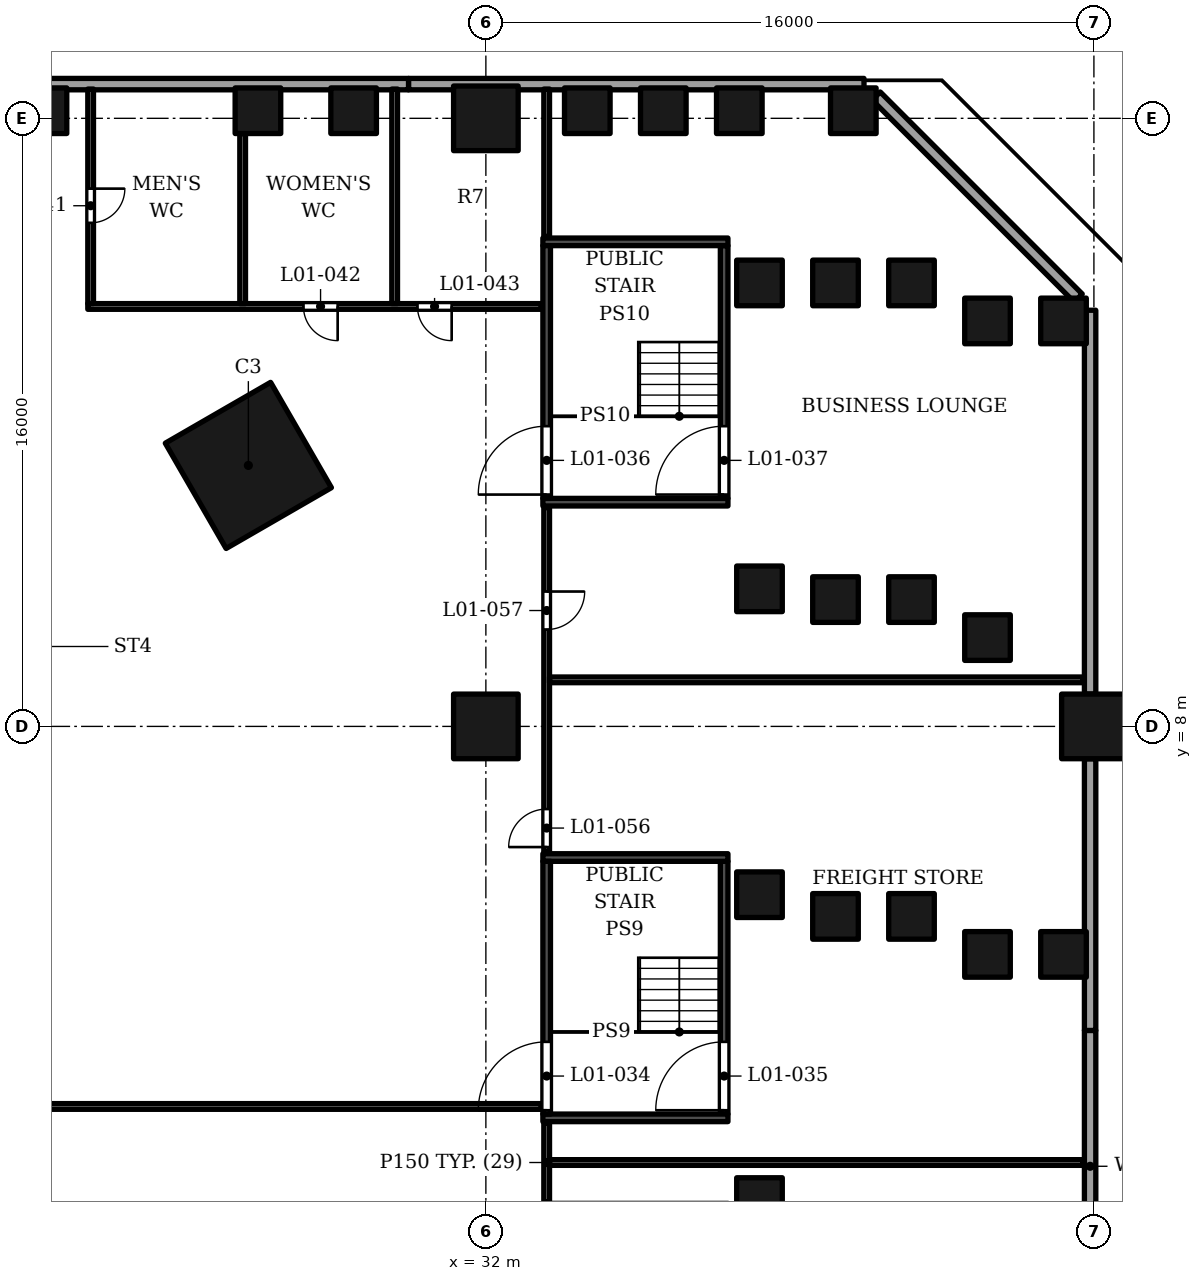
"""IFC4 building model, lengths in metres.
Left out: names, types, materials, properties, quantities, classifications, styles, units other than length and angle.
Written with IfcOpenShell. Run it as: python <this file> out.ifc"""

import sys

from ifc_helpers import new_model, si_unit, direction, frame, frame_2d, origin, origin_2d, place, context, subcontext, project, spatial, rectangle, extrude, element, fill, save


model = new_model("IFC4")
c1 = context("Model", 3, precision=1e-05, world=origin(), true_north=direction((0.0, 1.0)))
c2 = subcontext(c1, "Body", "Model", "MODEL_VIEW")
j1 = project(units=[si_unit("LENGTHUNIT", "METRE"), si_unit("PLANEANGLEUNIT", "RADIAN")], contexts=[c1])
p1 = place(None, origin())
s1 = spatial("IfcSite", under=j1, at=p1, CompositionType="ELEMENT")
p2 = place(p1, origin())
s2 = spatial("IfcBuilding", under=s1, at=p2, CompositionType="ELEMENT")
p3 = place(p2, frame((0.0, 0.0, 9.0)))
s3 = spatial("IfcBuildingStorey", under=s2, at=p3, CompositionType="ELEMENT", Elevation=9.0)
for number, where, z_axis, x_axis in (
    (1, (32.0, 8.0, 0.0), (0.0, 0.0, 1.0), (1.0, 0.0, 0.0)),
    (2, (32.0, 24.0, 0.0), (0.0, 0.0, 1.0), (1.0, 0.0, 0.0)),
    (3, (48.0, 8.0, 0.0), (0.0, 0.0, 1.0), (1.0, 0.0, 0.0)),
):
    element("IfcColumn", number, at=place(p3, frame(where, z_axis=z_axis, x_axis=x_axis)), inside=s3, PredefinedType="COLUMN", context=c2, shape_type="SweptSolid", body=[
        extrude(rectangle(XDim=1.7, YDim=1.7, at=origin_2d()), origin(), (0.0, 0.0, 1.0), 11.0),
    ])
for number, where, z_axis, x_axis in (
    (4, (34.669, 24.2, 0.0), (0.0, 0.0, 1.0), (1.0, 0.0, 0.0)),
    (5, (39.2, 19.669, 0.0), (0.0, 0.0, 1.0), (1.0, 0.0, 0.0)),
    (6, (26.002, 24.2, 0.0), (0.0, 0.0, 1.0), (1.0, 0.0, 0.0)),
    (7, (39.2, 11.62, 0.0), (0.0, 0.0, 1.0), (1.0, 0.0, 0.0)),
    (8, (39.2, 3.572, 0.0), (0.0, 0.0, 1.0), (1.0, 0.0, 0.0)),
    (9, (39.2, -4.476, 0.0), (0.0, 0.0, 1.0), (1.0, 0.0, 0.0)),
    (10, (36.669, 24.2, 0.0), (0.0, 0.0, 1.0), (1.0, 0.0, 0.0)),
    (11, (41.2, 19.669, 0.0), (0.0, 0.0, 1.0), (1.0, 0.0, 0.0)),
    (12, (20.372, 24.2, 0.0), (0.0, 0.0, 1.0), (1.0, 0.0, 0.0)),
    (13, (28.52, 24.2, 0.0), (0.0, 0.0, 1.0), (1.0, 0.0, 0.0)),
    (14, (41.2, 11.337, 0.0), (0.0, 0.0, 1.0), (1.0, 0.0, 0.0)),
    (15, (41.2, 3.001, 0.0), (0.0, 0.0, 1.0), (1.0, 0.0, 0.0)),
    (16, (38.669, 24.2, 0.0), (0.0, 0.0, 1.0), (1.0, 0.0, 0.0)),
    (17, (43.2, 19.669, 0.0), (0.0, 0.0, 1.0), (1.0, 0.0, 0.0)),
    (18, (43.2, 11.337, 0.0), (0.0, 0.0, 1.0), (1.0, 0.0, 0.0)),
    (19, (43.2, 3.001, 0.0), (0.0, 0.0, 1.0), (1.0, 0.0, 0.0)),
    (20, (45.2, 18.669, 0.0), (0.0, 0.0, 1.0), (1.0, 0.0, 0.0)),
    (21, (45.2, 10.337, 0.0), (0.0, 0.0, 1.0), (1.0, 0.0, 0.0)),
    (22, (45.2, 2.001, 0.0), (0.0, 0.0, 1.0), (1.0, 0.0, 0.0)),
    (23, (41.669, 24.2, 0.0), (0.0, 0.0, 1.0), (1.0, 0.0, 0.0)),
    (24, (47.2, 18.669, 0.0), (0.0, 0.0, 1.0), (1.0, 0.0, 0.0)),
    (25, (47.2, 2.001, 0.0), (0.0, 0.0, 1.0), (1.0, 0.0, 0.0)),
):
    element("IfcColumn", number, at=place(p3, frame(where, z_axis=z_axis, x_axis=x_axis)), inside=s3, PredefinedType="COLUMN", context=c2, shape_type="SweptSolid", body=[
        extrude(rectangle(XDim=1.2, YDim=1.2, at=origin_2d()), origin(), (0.0, 0.0, 1.0), 11.0),
    ])
p4 = place(p3, frame((25.75, 14.867, 0.0), z_axis=(0.0, 0.0, 1.0), x_axis=(-0.866025386331, -0.50000003023, 0.0)))
e26 = element("IfcColumn", 26, at=p4, inside=s3, PredefinedType="COLUMN", context=c2, shape_type="SweptSolid", body=[
    extrude(rectangle(XDim=3.2, YDim=3.2, at=origin_2d()), origin(), (0.0, 0.0, 1.0), 11.0),
])
for number, where, z_axis, x_axis in (
    (27, (47.9, -7.148, 0.0), (0.0, 0.0, 1.0), (0.0, 1.0, 0.0)),
    (28, (47.9, 0.0, 0.0), (0.0, 0.0, 1.0), (0.0, 1.0, 0.0)),
):
    element("IfcWall", number, at=place(p3, frame(where, z_axis=z_axis, x_axis=x_axis)), inside=s3, PredefinedType="SOLIDWALL", context=c2, shape_type="SweptSolid", body=[
        extrude(rectangle(XDim=7.148, YDim=0.3, at=frame_2d((3.574, 0.0))), origin(), (0.0, 0.0, 1.0), 9.6),
    ])
p5 = place(p3, frame((47.9, 8.852, 0.0), z_axis=(0.0, 0.0, 1.0), x_axis=(0.0, 1.0, 0.0)))
e29 = element("IfcWall", 29, at=p5, inside=s3, PredefinedType="SOLIDWALL", context=c2, shape_type="SweptSolid", body=[
    extrude(rectangle(XDim=10.098, YDim=0.3, at=frame_2d((5.049, 0.0))), origin(), (0.0, 0.0, 1.0), 9.6),
])
p6 = place(p3, frame((47.588, 19.271, 0.0), z_axis=(0.0, 0.0, 1.0), x_axis=(-0.707106781187, 0.707106781187, 0.0)))
e30 = element("IfcWall", 30, at=p6, inside=s3, PredefinedType="SOLIDWALL", context=c2, shape_type="SweptSolid", body=[
    extrude(rectangle(XDim=7.519, YDim=0.3, at=frame_2d((3.759, 0.0))), origin(), (0.0, 0.0, 1.0), 9.6),
])
p7 = place(p3, frame((41.95, 24.9, 0.0), z_axis=(0.0, 0.0, 1.0), x_axis=(-1.0, 0.0, 0.0)))
e31 = element("IfcWall", 31, at=p7, inside=s3, PredefinedType="SOLIDWALL", context=c2, shape_type="SweptSolid", body=[
    extrude(rectangle(XDim=11.986, YDim=0.3, at=frame_2d((5.993, 0.0))), origin(), (0.0, 0.0, 1.0), 9.6),
])
p8 = place(p3, frame((29.964, 24.9, 0.0), z_axis=(0.0, 0.0, 1.0), x_axis=(-1.0, 0.0, 0.0)))
e32 = element("IfcWall", 32, at=p8, inside=s3, PredefinedType="SOLIDWALL", context=c2, shape_type="SweptSolid", body=[
    extrude(rectangle(XDim=11.986, YDim=0.3, at=frame_2d((5.993, 0.0))), origin(), (0.0, 0.0, 1.0), 9.6),
])
for number, where, z_axis, x_axis in (
    (33, (47.85, -10.395, 11.0), (0.0, 0.0, 1.0), (0.0, 1.0, 0.0)),
    (34, (47.85, 4.302, 11.0), (0.0, 0.0, 1.0), (0.0, 1.0, 0.0)),
):
    element("IfcWall", number, at=place(p3, frame(where, z_axis=z_axis, x_axis=x_axis)), inside=s3, PredefinedType="PARAPET", context=c2, shape_type="SweptSolid", body=[
        extrude(rectangle(XDim=14.698, YDim=0.3, at=frame_2d((7.349, 0.0))), origin(), (0.0, 0.0, 1.0), 1.1),
    ])
p9 = place(p3, frame((47.745, 19.042, 11.0), z_axis=(0.0, 0.0, 1.0), x_axis=(-0.707092029666, 0.7071215324, 0.0)))
e35 = element("IfcWall", 35, at=p9, inside=s3, PredefinedType="PARAPET", context=c2, shape_type="SweptSolid", body=[
    extrude(rectangle(XDim=8.275, YDim=0.3, at=frame_2d((4.138, 0.0))), origin(), (0.0, 0.0, 1.0), 1.1),
])
p10 = place(p3, frame((41.79, 24.85, 11.0), z_axis=(0.0, 0.0, 1.0), x_axis=(-1.0, 0.0, 0.0)))
e36 = element("IfcWall", 36, at=p10, inside=s3, PredefinedType="PARAPET", context=c2, shape_type="SweptSolid", body=[
    extrude(rectangle(XDim=1.04, YDim=0.3, at=frame_2d((0.52, 0.0))), origin(), (0.0, 0.0, 1.0), 1.1),
])
for number, where, z_axis, x_axis in (
    (37, (33.5, -2.3, 0.0), (0.0, 0.0, 1.0), (1.0, 0.0, 0.0)),
    (38, (33.5, 4.55, 0.0), (0.0, 0.0, 1.0), (1.0, 0.0, 0.0)),
):
    element("IfcWall", number, at=place(p3, frame(where, z_axis=z_axis, x_axis=x_axis)), inside=s3, PredefinedType="SOLIDWALL", context=c2, shape_type="SweptSolid", body=[
        extrude(rectangle(XDim=4.87, YDim=0.2, at=frame_2d((2.435, 0.0))), origin(), (0.0, 0.0, 1.0), 10.5),
    ])
p11 = place(p3, frame((33.6, -2.2, 0.0), z_axis=(0.0, 0.0, 1.0), x_axis=(0.0, 1.0, 0.0)))
e39 = element("IfcWall", 39, at=p11, inside=s3, PredefinedType="SOLIDWALL", context=c2, shape_type="SweptSolid", body=[
    extrude(rectangle(XDim=6.65, YDim=0.2, at=frame_2d((3.325, 0.0))), origin(), (0.0, 0.0, 1.0), 10.5),
])
p12 = place(p11, frame((0.1, 0.0, 0.0)))
e40 = element("IfcOpeningElement", 40, at=p12, cuts=e39, PredefinedType="OPENING", context=c2, shape_type="SweptSolid", body=[
    extrude(rectangle(XDim=1.8, YDim=2.4, at=frame_2d((0.9, 1.2))), frame((0.0, 0.11, 0.0), z_axis=(0.0, -1.0, 0.0), x_axis=(1.0, 0.0, 0.0)), (0.0, 0.0, 1.0), 0.22),
])
p13 = place(p3, frame((38.27, -2.2, 0.0), z_axis=(0.0, 0.0, 1.0), x_axis=(0.0, 1.0, 0.0)))
e41 = element("IfcWall", 41, at=p13, inside=s3, PredefinedType="SOLIDWALL", context=c2, shape_type="SweptSolid", body=[
    extrude(rectangle(XDim=6.65, YDim=0.2, at=frame_2d((3.325, 0.0))), origin(), (0.0, 0.0, 1.0), 10.5),
])
p14 = place(p13, frame((0.1, 0.0, 0.0)))
e42 = element("IfcOpeningElement", 42, at=p14, cuts=e41, PredefinedType="OPENING", context=c2, shape_type="SweptSolid", body=[
    extrude(rectangle(XDim=1.8, YDim=2.4, at=frame_2d((0.9, 1.2))), frame((0.0, 0.11, 0.0), z_axis=(0.0, -1.0, 0.0), x_axis=(1.0, 0.0, 0.0)), (0.0, 0.0, 1.0), 0.22),
])
for number, where, z_axis, x_axis in (
    (43, (33.5, 13.9, 0.0), (0.0, 0.0, 1.0), (1.0, 0.0, 0.0)),
    (44, (33.5, 20.75, 0.0), (0.0, 0.0, 1.0), (1.0, 0.0, 0.0)),
):
    element("IfcWall", number, at=place(p3, frame(where, z_axis=z_axis, x_axis=x_axis)), inside=s3, PredefinedType="SOLIDWALL", context=c2, shape_type="SweptSolid", body=[
        extrude(rectangle(XDim=4.87, YDim=0.2, at=frame_2d((2.435, 0.0))), origin(), (0.0, 0.0, 1.0), 10.5),
    ])
p15 = place(p3, frame((33.6, 14.0, 0.0), z_axis=(0.0, 0.0, 1.0), x_axis=(0.0, 1.0, 0.0)))
e45 = element("IfcWall", 45, at=p15, inside=s3, PredefinedType="SOLIDWALL", context=c2, shape_type="SweptSolid", body=[
    extrude(rectangle(XDim=6.65, YDim=0.2, at=frame_2d((3.325, 0.0))), origin(), (0.0, 0.0, 1.0), 10.5),
])
p16 = place(p15, frame((0.1, 0.0, 0.0)))
e46 = element("IfcOpeningElement", 46, at=p16, cuts=e45, PredefinedType="OPENING", context=c2, shape_type="SweptSolid", body=[
    extrude(rectangle(XDim=1.8, YDim=2.4, at=frame_2d((0.9, 1.2))), frame((0.0, 0.11, 0.0), z_axis=(0.0, -1.0, 0.0), x_axis=(1.0, 0.0, 0.0)), (0.0, 0.0, 1.0), 0.22),
])
p17 = place(p3, frame((38.27, 14.0, 0.0), z_axis=(0.0, 0.0, 1.0), x_axis=(0.0, 1.0, 0.0)))
e47 = element("IfcWall", 47, at=p17, inside=s3, PredefinedType="SOLIDWALL", context=c2, shape_type="SweptSolid", body=[
    extrude(rectangle(XDim=6.65, YDim=0.2, at=frame_2d((3.325, 0.0))), origin(), (0.0, 0.0, 1.0), 10.5),
])
p18 = place(p17, frame((0.1, 0.0, 0.0)))
e48 = element("IfcOpeningElement", 48, at=p18, cuts=e47, PredefinedType="OPENING", context=c2, shape_type="SweptSolid", body=[
    extrude(rectangle(XDim=1.8, YDim=2.4, at=frame_2d((0.9, 1.2))), frame((0.0, 0.11, 0.0), z_axis=(0.0, -1.0, 0.0), x_axis=(1.0, 0.0, 0.0)), (0.0, 0.0, 1.0), 0.22),
])
p19 = place(p3, frame((33.6, -4.51, 0.0), z_axis=(0.0, 0.0, 1.0), x_axis=(0.0, 1.0, 0.0)))
e49 = element("IfcWall", 49, at=p19, inside=s3, PredefinedType="PARTITIONING", context=c2, shape_type="SweptSolid", body=[
    extrude(rectangle(XDim=2.07, YDim=0.15, at=frame_2d((1.035, 0.0))), origin(), (0.0, 0.0, 1.0), 10.5),
])
p20 = place(p3, frame((33.675, -3.475, 0.0), z_axis=(0.0, 0.0, 1.0), x_axis=(1.0, 0.0, 0.0)))
e50 = element("IfcWall", 50, at=p20, inside=s3, PredefinedType="PARTITIONING", context=c2, shape_type="SweptSolid", body=[
    extrude(rectangle(XDim=14.045, YDim=0.15, at=frame_2d((7.022, 0.0))), origin(), (0.0, 0.0, 1.0), 9.6),
])
p21 = place(p3, frame((-33.46, -2.0, 0.0), z_axis=(0.0, 0.0, 1.0), x_axis=(1.0, 0.0, 0.0)))
e51 = element("IfcWall", 51, at=p21, inside=s3, PredefinedType="PARTITIONING", context=c2, shape_type="SweptSolid", body=[
    extrude(rectangle(XDim=66.92, YDim=0.15, at=frame_2d((33.46, 0.0))), origin(), (0.0, 0.0, 1.0), 9.3),
])
p22 = place(p21, frame((32.309, 0.0, 0.0)))
e52 = element("IfcOpeningElement", 52, at=p22, cuts=e51, PredefinedType="OPENING", context=c2, shape_type="SweptSolid", body=[
    extrude(rectangle(XDim=2.4, YDim=2.4, at=frame_2d((1.2, 1.2))), frame((0.0, 0.085, 0.0), z_axis=(0.0, -1.0, 0.0), x_axis=(1.0, 0.0, 0.0)), (0.0, 0.0, 1.0), 0.17),
])
p23 = place(p21, frame((27.559, 0.0, 0.0)))
e53 = element("IfcOpeningElement", 53, at=p23, cuts=e51, PredefinedType="OPENING", context=c2, shape_type="SweptSolid", body=[
    extrude(rectangle(XDim=2.4, YDim=2.4, at=frame_2d((1.2, 1.2))), frame((0.0, 0.085, 0.0), z_axis=(0.0, -1.0, 0.0), x_axis=(1.0, 0.0, 0.0)), (0.0, 0.0, 1.0), 0.17),
])
p24 = place(p21, frame((37.059, 0.0, 0.0)))
e54 = element("IfcOpeningElement", 54, at=p24, cuts=e51, PredefinedType="OPENING", context=c2, shape_type="SweptSolid", body=[
    extrude(rectangle(XDim=2.4, YDim=2.4, at=frame_2d((1.2, 1.2))), frame((0.0, 0.085, 0.0), z_axis=(0.0, -1.0, 0.0), x_axis=(1.0, 0.0, 0.0)), (0.0, 0.0, 1.0), 0.17),
])
p25 = place(p21, frame((22.809, 0.0, 0.0)))
e55 = element("IfcOpeningElement", 55, at=p25, cuts=e51, PredefinedType="OPENING", context=c2, shape_type="SweptSolid", body=[
    extrude(rectangle(XDim=2.4, YDim=2.4, at=frame_2d((1.2, 1.2))), frame((0.0, 0.085, 0.0), z_axis=(0.0, -1.0, 0.0), x_axis=(1.0, 0.0, 0.0)), (0.0, 0.0, 1.0), 0.17),
])
p26 = place(p3, frame((33.6, 4.69, 0.0), z_axis=(0.0, 0.0, 1.0), x_axis=(0.0, 1.0, 0.0)))
e56 = element("IfcWall", 56, at=p26, inside=s3, PredefinedType="PARTITIONING", context=c2, shape_type="SweptSolid", body=[
    extrude(rectangle(XDim=9.07, YDim=0.15, at=frame_2d((4.535, 0.0))), origin(), (0.0, 0.0, 1.0), 9.3),
])
p27 = place(p26, frame((0.135, 0.0, 0.0)))
e57 = element("IfcOpeningElement", 57, at=p27, cuts=e56, PredefinedType="OPENING", context=c2, shape_type="SweptSolid", body=[
    extrude(rectangle(XDim=1.0, YDim=2.1, at=frame_2d((0.5, 1.05))), frame((0.0, 0.085, 0.0), z_axis=(0.0, -1.0, 0.0), x_axis=(1.0, 0.0, 0.0)), (0.0, 0.0, 1.0), 0.17),
])
p28 = place(p26, frame((5.859, 0.0, 0.0)))
e58 = element("IfcOpeningElement", 58, at=p28, cuts=e56, PredefinedType="OPENING", context=c2, shape_type="SweptSolid", body=[
    extrude(rectangle(XDim=1.0, YDim=2.1, at=frame_2d((0.5, 1.05))), frame((0.0, 0.085, 0.0), z_axis=(0.0, -1.0, 0.0), x_axis=(1.0, 0.0, 0.0)), (0.0, 0.0, 1.0), 0.17),
])
p29 = place(p3, frame((33.675, 9.225, 0.0), z_axis=(0.0, 0.0, 1.0), x_axis=(1.0, 0.0, 0.0)))
e59 = element("IfcWall", 59, at=p29, inside=s3, PredefinedType="PARTITIONING", context=c2, shape_type="SweptSolid", body=[
    extrude(rectangle(XDim=14.045, YDim=0.15, at=frame_2d((7.022, 0.0))), origin(), (0.0, 0.0, 1.0), 9.6),
])
p30 = place(p3, frame((21.525, 19.05, 0.0), z_axis=(0.0, 0.0, 1.0), x_axis=(1.0, 0.0, 0.0)))
e60 = element("IfcWall", 60, at=p30, inside=s3, PredefinedType="PARTITIONING", context=c2, shape_type="SweptSolid", body=[
    extrude(rectangle(XDim=11.935, YDim=0.15, at=frame_2d((5.968, 0.0))), origin(), (0.0, 0.0, 1.0), 9.3),
])
p31 = place(p30, frame((5.675, 0.0, 0.0)))
e61 = element("IfcOpeningElement", 61, at=p31, cuts=e60, PredefinedType="OPENING", context=c2, shape_type="SweptSolid", body=[
    extrude(rectangle(XDim=0.9, YDim=2.1, at=frame_2d((0.45, 1.05))), frame((0.0, 0.085, 0.0), z_axis=(0.0, -1.0, 0.0), x_axis=(1.0, 0.0, 0.0)), (0.0, 0.0, 1.0), 0.17),
])
p32 = place(p30, frame((8.675, 0.0, 0.0)))
e62 = element("IfcOpeningElement", 62, at=p32, cuts=e60, PredefinedType="OPENING", context=c2, shape_type="SweptSolid", body=[
    extrude(rectangle(XDim=0.9, YDim=2.1, at=frame_2d((0.45, 1.05))), frame((0.0, 0.085, 0.0), z_axis=(0.0, -1.0, 0.0), x_axis=(1.0, 0.0, 0.0)), (0.0, 0.0, 1.0), 0.17),
])
p33 = place(p3, frame((21.6, 19.125, 0.0), z_axis=(0.0, 0.0, 1.0), x_axis=(0.0, 1.0, 0.0)))
e63 = element("IfcWall", 63, at=p33, inside=s3, PredefinedType="PARTITIONING", context=c2, shape_type="SweptSolid", body=[
    extrude(rectangle(XDim=5.645, YDim=0.15, at=frame_2d((2.823, 0.0))), origin(), (0.0, 0.0, 1.0), 9.3),
])
p34 = place(p33, frame((2.125, 0.0, 0.0)))
e64 = element("IfcOpeningElement", 64, at=p34, cuts=e63, PredefinedType="OPENING", context=c2, shape_type="SweptSolid", body=[
    extrude(rectangle(XDim=0.9, YDim=2.1, at=frame_2d((0.45, 1.05))), frame((0.0, 0.085, 0.0), z_axis=(0.0, -1.0, 0.0), x_axis=(1.0, 0.0, 0.0)), (0.0, 0.0, 1.0), 0.17),
])
p35 = place(p3, frame((25.6, 19.125, 0.0), z_axis=(0.0, 0.0, 1.0), x_axis=(0.0, 1.0, 0.0)))
e65 = element("IfcWall", 65, at=p35, inside=s3, PredefinedType="PARTITIONING", context=c2, shape_type="SweptSolid", body=[
    extrude(rectangle(XDim=4.475, YDim=0.15, at=frame_2d((2.238, 0.0))), origin(), (0.0, 0.0, 1.0), 10.5),
])
p36 = place(p3, frame((29.6, 19.125, 0.0), z_axis=(0.0, 0.0, 1.0), x_axis=(0.0, 1.0, 0.0)))
e66 = element("IfcWall", 66, at=p36, inside=s3, PredefinedType="PARTITIONING", context=c2, shape_type="SweptSolid", body=[
    extrude(rectangle(XDim=5.645, YDim=0.15, at=frame_2d((2.823, 0.0))), origin(), (0.0, 0.0, 1.0), 9.3),
])
p37 = place(p3, frame((33.6, 20.89, 0.0), z_axis=(0.0, 0.0, 1.0), x_axis=(0.0, 1.0, 0.0)))
e67 = element("IfcWall", 67, at=p37, inside=s3, PredefinedType="PARTITIONING", context=c2, shape_type="SweptSolid", body=[
    extrude(rectangle(XDim=3.88, YDim=0.15, at=frame_2d((1.94, 0.0))), origin(), (0.0, 0.0, 1.0), 9.6),
])
p38 = place(p12, origin())
e68 = element("IfcDoor", 68, at=p38, inside=s3, OperationType="DOUBLE_DOOR_SINGLE_SWING", PredefinedType="DOOR", context=c2, shape_type="SweptSolid", body=[
    extrude(rectangle(XDim=1.8, YDim=2.4, at=frame_2d((0.9, 1.2))), frame((0.0, 0.025, 0.0), z_axis=(0.0, -1.0, 0.0), x_axis=(1.0, 0.0, 0.0)), (0.0, 0.0, 1.0), 0.05),
])
fill(e40, e68)
p39 = place(p14, origin())
e69 = element("IfcDoor", 69, at=p39, inside=s3, OperationType="DOUBLE_DOOR_SINGLE_SWING", PredefinedType="DOOR", context=c2, shape_type="SweptSolid", body=[
    extrude(rectangle(XDim=1.8, YDim=2.4, at=frame_2d((0.9, 1.2))), frame((0.0, 0.025, 0.0), z_axis=(0.0, -1.0, 0.0), x_axis=(1.0, 0.0, 0.0)), (0.0, 0.0, 1.0), 0.05),
])
fill(e42, e69)
p40 = place(p16, origin())
e70 = element("IfcDoor", 70, at=p40, inside=s3, OperationType="DOUBLE_DOOR_SINGLE_SWING", PredefinedType="DOOR", context=c2, shape_type="SweptSolid", body=[
    extrude(rectangle(XDim=1.8, YDim=2.4, at=frame_2d((0.9, 1.2))), frame((0.0, 0.025, 0.0), z_axis=(0.0, -1.0, 0.0), x_axis=(1.0, 0.0, 0.0)), (0.0, 0.0, 1.0), 0.05),
])
fill(e46, e70)
p41 = place(p18, origin())
e71 = element("IfcDoor", 71, at=p41, inside=s3, OperationType="DOUBLE_DOOR_SINGLE_SWING", PredefinedType="DOOR", context=c2, shape_type="SweptSolid", body=[
    extrude(rectangle(XDim=1.8, YDim=2.4, at=frame_2d((0.9, 1.2))), frame((0.0, 0.025, 0.0), z_axis=(0.0, -1.0, 0.0), x_axis=(1.0, 0.0, 0.0)), (0.0, 0.0, 1.0), 0.05),
])
fill(e48, e71)
p42 = place(p34, origin())
e72 = element("IfcDoor", 72, at=p42, inside=s3, OperationType="SINGLE_SWING_RIGHT", PredefinedType="DOOR", context=c2, shape_type="SweptSolid", body=[
    extrude(rectangle(XDim=0.9, YDim=2.1, at=frame_2d((0.45, 1.05))), frame((0.0, 0.025, 0.0), z_axis=(0.0, -1.0, 0.0), x_axis=(1.0, 0.0, 0.0)), (0.0, 0.0, 1.0), 0.05),
])
fill(e64, e72)
p43 = place(p31, origin())
e73 = element("IfcDoor", 73, at=p43, inside=s3, OperationType="SINGLE_SWING_RIGHT", PredefinedType="DOOR", context=c2, shape_type="SweptSolid", body=[
    extrude(rectangle(XDim=0.9, YDim=2.1, at=frame_2d((0.45, 1.05))), frame((0.0, 0.025, 0.0), z_axis=(0.0, -1.0, 0.0), x_axis=(1.0, 0.0, 0.0)), (0.0, 0.0, 1.0), 0.05),
])
fill(e61, e73)
p44 = place(p32, origin())
e74 = element("IfcDoor", 74, at=p44, inside=s3, OperationType="SINGLE_SWING_RIGHT", PredefinedType="DOOR", context=c2, shape_type="SweptSolid", body=[
    extrude(rectangle(XDim=0.9, YDim=2.1, at=frame_2d((0.45, 1.05))), frame((0.0, 0.025, 0.0), z_axis=(0.0, -1.0, 0.0), x_axis=(1.0, 0.0, 0.0)), (0.0, 0.0, 1.0), 0.05),
])
fill(e62, e74)
p45 = place(p27, origin())
e75 = element("IfcDoor", 75, at=p45, inside=s3, OperationType="SINGLE_SWING_LEFT", PredefinedType="DOOR", context=c2, shape_type="SweptSolid", body=[
    extrude(rectangle(XDim=1.0, YDim=2.1, at=frame_2d((0.5, 1.05))), frame((0.0, 0.025, 0.0), z_axis=(0.0, -1.0, 0.0), x_axis=(1.0, 0.0, 0.0)), (0.0, 0.0, 1.0), 0.05),
])
fill(e57, e75)
p46 = place(p28, origin())
e76 = element("IfcDoor", 76, at=p46, inside=s3, OperationType="SINGLE_SWING_RIGHT", PredefinedType="DOOR", context=c2, shape_type="SweptSolid", body=[
    extrude(rectangle(XDim=1.0, YDim=2.1, at=frame_2d((0.5, 1.05))), frame((0.0, 0.025, 0.0), z_axis=(0.0, -1.0, 0.0), x_axis=(1.0, 0.0, 0.0)), (0.0, 0.0, 1.0), 0.05),
])
fill(e58, e76)
save(model, sys.argv[1])
